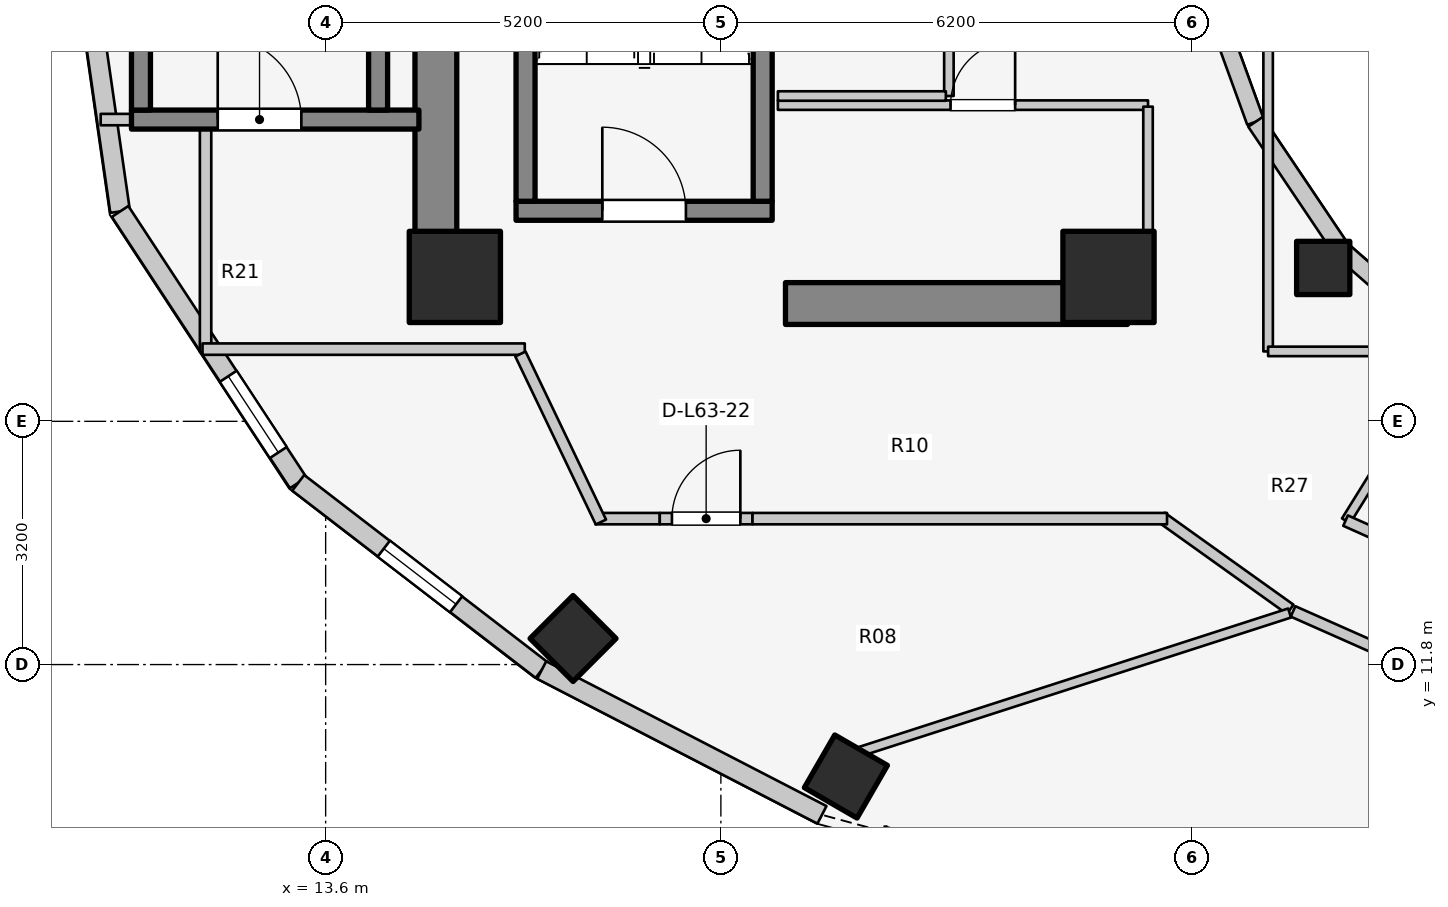
"""IFC4 building model, lengths in metres.
Left out: names, types, materials, properties, quantities, classifications, styles, units other than length and angle.
Written with IfcOpenShell. Run it as: python <this file> out.ifc"""

import sys

from ifc_helpers import new_model, si_unit, direction, frame, frame_2d, origin, origin_2d, place, context, subcontext, project, spatial, rectangle, extrude, element, fill, save


model = new_model("IFC4")
c1 = context("Model", 3, precision=1e-05, world=origin(), true_north=direction((0.0, 1.0)))
c2 = subcontext(c1, "Body", "Model", "MODEL_VIEW")
j1 = project(units=[si_unit("LENGTHUNIT", "METRE"), si_unit("PLANEANGLEUNIT", "RADIAN")], contexts=[c1])
p1 = place(None, origin())
s1 = spatial("IfcSite", under=j1, at=p1, CompositionType="ELEMENT")
p2 = place(p1, origin())
s2 = spatial("IfcBuilding", under=s1, at=p2, CompositionType="ELEMENT")
p3 = place(p2, frame((0.0, 0.0, 207.8)))
s3 = spatial("IfcBuildingStorey", under=s2, at=p3, CompositionType="ELEMENT", Elevation=207.8)
p4 = place(p3, frame((15.05, 17.05, 0.0), z_axis=(0.0, 0.0, 1.0), x_axis=(0.0, 1.0, 0.0)))
e1 = element("IfcWall", 1, at=p4, inside=s3, PredefinedType="SHEAR", context=c2, shape_type="SweptSolid", body=[
    extrude(rectangle(XDim=12.8, YDim=0.55, at=frame_2d((6.4, 0.0))), origin(), (0.0, 0.0, 1.0), 3.1),
])
p5 = place(p3, frame((19.65, 16.55, 0.0), z_axis=(0.0, 0.0, 1.0), x_axis=(1.0, 0.0, 0.0)))
e2 = element("IfcWall", 2, at=p5, inside=s3, PredefinedType="SHEAR", context=c2, shape_type="SweptSolid", body=[
    extrude(rectangle(XDim=4.5, YDim=0.55, at=frame_2d((2.25, 0.0))), origin(), (0.0, 0.0, 1.0), 3.1),
])
p6 = place(p3, frame((16.105, 17.77, 0.0), z_axis=(0.0, 0.0, 1.0), x_axis=(1.0, 0.0, 0.0)))
e3 = element("IfcWall", 3, at=p6, inside=s3, PredefinedType="SOLIDWALL", context=c2, shape_type="SweptSolid", body=[
    extrude(rectangle(XDim=3.37, YDim=0.25, at=frame_2d((1.685, 0.0))), origin(), (0.0, 0.0, 1.0), 3.1),
])
p7 = place(p6, frame((1.135, 0.0, 0.0)))
e4 = element("IfcOpeningElement", 4, at=p7, cuts=e3, PredefinedType="OPENING", context=c2, shape_type="SweptSolid", body=[
    extrude(rectangle(XDim=1.1, YDim=2.1, at=frame_2d((0.55, 1.05))), frame((0.0, 0.135, 0.0), z_axis=(0.0, -1.0, 0.0), x_axis=(1.0, 0.0, 0.0)), (0.0, 0.0, 1.0), 0.27),
])
for number, where, z_axis, x_axis in (
    (5, (16.23, 17.895, 0.0), (0.0, 0.0, 1.0), (0.0, 1.0, 0.0)),
    (6, (19.35, 17.895, 0.0), (0.0, 0.0, 1.0), (0.0, 1.0, 0.0)),
):
    element("IfcWall", number, at=place(p3, frame(where, z_axis=z_axis, x_axis=x_axis)), inside=s3, PredefinedType="SOLIDWALL", context=c2, shape_type="SweptSolid", body=[
        extrude(rectangle(XDim=7.81, YDim=0.25, at=frame_2d((3.905, 0.0))), origin(), (0.0, 0.0, 1.0), 3.1),
    ])
p8 = place(p3, frame((11.045, 18.97, 0.0), z_axis=(0.0, 0.0, 1.0), x_axis=(1.0, 0.0, 0.0)))
e7 = element("IfcWall", 7, at=p8, inside=s3, PredefinedType="SOLIDWALL", context=c2, shape_type="SweptSolid", body=[
    extrude(rectangle(XDim=3.782, YDim=0.25, at=frame_2d((1.891, 0.0))), origin(), (0.0, 0.0, 1.0), 3.1),
])
p9 = place(p8, frame((1.135, 0.0, 0.0)))
e8 = element("IfcOpeningElement", 8, at=p9, cuts=e7, PredefinedType="OPENING", context=c2, shape_type="SweptSolid", body=[
    extrude(rectangle(XDim=1.1, YDim=2.1, at=frame_2d((0.55, 1.05))), frame((0.0, 0.135, 0.0), z_axis=(0.0, -1.0, 0.0), x_axis=(1.0, 0.0, 0.0)), (0.0, 0.0, 1.0), 0.27),
])
for number, where, z_axis, x_axis in (
    (9, (11.17, 19.095, 0.0), (0.0, 0.0, 1.0), (0.0, 1.0, 0.0)),
    (10, (14.29, 19.095, 0.0), (0.0, 0.0, 1.0), (0.0, 1.0, 0.0)),
):
    element("IfcWall", number, at=place(p3, frame(where, z_axis=z_axis, x_axis=x_axis)), inside=s3, PredefinedType="SOLIDWALL", context=c2, shape_type="SweptSolid", body=[
        extrude(rectangle(XDim=7.81, YDim=0.25, at=frame_2d((3.905, 0.0))), origin(), (0.0, 0.0, 1.0), 3.1),
    ])
for number, where, z_axis, x_axis in (
    (11, (15.3, 16.9, 0.0), (0.0, 0.0, 1.0), (1.0, 0.0, 0.0)),
    (12, (23.9, 16.9, 0.0), (0.0, 0.0, 1.0), (1.0, 0.0, 0.0)),
):
    element("IfcColumn", number, at=place(p3, frame(where, z_axis=z_axis, x_axis=x_axis)), inside=s3, PredefinedType="COLUMN", context=c2, shape_type="SweptSolid", body=[
        extrude(rectangle(XDim=1.2, YDim=1.2, at=origin_2d()), origin(), (0.0, 0.0, 1.0), 3.1),
    ])
p10 = place(p3, frame((26.725, 17.018, 0.0), z_axis=(0.0, 0.0, 1.0), x_axis=(1.0, 0.0, 0.0)))
e13 = element("IfcColumn", 13, at=p10, inside=s3, PredefinedType="COLUMN", context=c2, shape_type="SweptSolid", body=[
    extrude(rectangle(XDim=0.7, YDim=0.7, at=origin_2d()), origin(), (0.0, 0.0, 1.0), 3.1),
])
for number, where, z_axis, x_axis in (
    (14, (16.855, 12.143, 0.0), (0.0, 0.0, 1.0), (-0.707, -0.707, 0.0)),
    (15, (20.445, 10.327, 0.0), (0.0, 0.0, 1.0), (-0.5, -0.866, 0.0)),
):
    element("IfcColumn", number, at=place(p3, frame(where, z_axis=z_axis, x_axis=x_axis)), inside=s3, PredefinedType="COLUMN", context=c2, shape_type="SweptSolid", body=[
        extrude(rectangle(XDim=0.8, YDim=0.8, at=origin_2d()), origin(), (0.0, 0.0, 1.0), 3.1),
    ])
p11 = place(p3, frame((25.123, 20.898, 0.0), z_axis=(0.0, 0.0, 1.0), x_axis=(0.341423187295, -0.93990968033, 0.0)))
e16 = element("IfcWall", 16, at=p11, inside=s3, PredefinedType="STANDARD", context=c2, shape_type="SweptSolid", body=[
    extrude(rectangle(XDim=2.084, YDim=0.23, at=frame_2d((1.042, 0.0))), origin(), (0.0, 0.0, 1.0), 2.56),
])
p12 = place(p3, frame((25.834, 18.94, 0.0), z_axis=(0.0, 0.0, 1.0), x_axis=(0.558197800898, -0.829707909492, 0.0)))
e17 = element("IfcWall", 17, at=p12, inside=s3, PredefinedType="STANDARD", context=c2, shape_type="SweptSolid", body=[
    extrude(rectangle(XDim=2.027, YDim=0.23, at=frame_2d((1.013, 0.0))), origin(), (0.0, 0.0, 1.0), 1.22),
])
p13 = place(p3, frame((26.965, 17.258, 0.0), z_axis=(0.0, 0.0, 1.0), x_axis=(0.752576694707, -0.658504607869, 0.0)))
e18 = element("IfcWall", 18, at=p13, inside=s3, PredefinedType="STANDARD", context=c2, shape_type="SweptSolid", body=[
    extrude(rectangle(XDim=1.959, YDim=0.23, at=frame_2d((0.98, 0.0))), origin(), (0.0, 0.0, 1.0), 1.22),
])
p14 = place(p3, frame((10.14, 23.0, 0.0), z_axis=(0.0, 0.0, 1.0), x_axis=(0.142712754019, -0.989764148593, 0.0)))
e19 = element("IfcWall", 19, at=p14, inside=s3, PredefinedType="STANDARD", context=c2, shape_type="SweptSolid", body=[
    extrude(rectangle(XDim=5.293, YDim=0.26, at=frame_2d((2.646, 0.0))), origin(), (0.0, 0.0, 1.0), 2.57),
])
p15 = place(p14, frame((1.458, 0.0, 0.75)))
e20 = element("IfcOpeningElement", 20, at=p15, cuts=e19, PredefinedType="OPENING", context=c2, shape_type="SweptSolid", body=[
    extrude(rectangle(XDim=1.2, YDim=1.5, at=frame_2d((0.6, 0.75))), frame((0.0, 0.14, 0.0), z_axis=(0.0, -1.0, 0.0), x_axis=(1.0, 0.0, 0.0)), (0.0, 0.0, 1.0), 0.28),
])
p16 = place(p3, frame((10.895, 17.761, 0.0), z_axis=(0.0, 0.0, 1.0), x_axis=(0.548776305075, -0.835969238064, 0.0)))
e21 = element("IfcWall", 21, at=p16, inside=s3, PredefinedType="STANDARD", context=c2, shape_type="SweptSolid", body=[
    extrude(rectangle(XDim=4.271, YDim=0.26, at=frame_2d((2.135, 0.0))), origin(), (0.0, 0.0, 1.0), 1.22),
])
p17 = place(p16, frame((2.594, 0.0, 0.15)))
e22 = element("IfcOpeningElement", 22, at=p17, cuts=e21, PredefinedType="OPENING", context=c2, shape_type="SweptSolid", body=[
    extrude(rectangle(XDim=1.2, YDim=0.9, at=frame_2d((0.6, 0.45))), frame((0.0, 0.14, 0.0), z_axis=(0.0, -1.0, 0.0), x_axis=(1.0, 0.0, 0.0)), (0.0, 0.0, 1.0), 0.28),
])
p18 = place(p3, frame((13.239, 14.191, 0.0), z_axis=(0.0, 0.0, 1.0), x_axis=(0.792713817907, -0.609593965603, 0.0)))
e23 = element("IfcWall", 23, at=p18, inside=s3, PredefinedType="STANDARD", context=c2, shape_type="SweptSolid", body=[
    extrude(rectangle(XDim=4.041, YDim=0.26, at=frame_2d((2.021, 0.0))), origin(), (0.0, 0.0, 1.0), 1.22),
])
p19 = place(p18, frame((1.42, 0.0, 0.15)))
e24 = element("IfcOpeningElement", 24, at=p19, cuts=e23, PredefinedType="OPENING", context=c2, shape_type="SweptSolid", body=[
    extrude(rectangle(XDim=1.2, YDim=0.9, at=frame_2d((0.6, 0.45))), frame((0.0, 0.14, 0.0), z_axis=(0.0, -1.0, 0.0), x_axis=(1.0, 0.0, 0.0)), (0.0, 0.0, 1.0), 0.28),
])
p20 = place(p3, frame((16.442, 11.728, 0.0), z_axis=(0.0, 0.0, 1.0), x_axis=(0.88849146803, -0.458893137057, 0.0)))
e25 = element("IfcWall", 25, at=p20, inside=s3, PredefinedType="STANDARD", context=c2, shape_type="SweptSolid", body=[
    extrude(rectangle(XDim=4.15, YDim=0.26, at=frame_2d((2.075, 0.0))), origin(), (0.0, 0.0, 1.0), 1.22),
])
p21 = place(p3, frame((19.55, 19.16, 0.0), z_axis=(0.0, 0.0, 1.0), x_axis=(1.0, 0.0, 0.0)))
e26 = element("IfcWall", 26, at=p21, inside=s3, PredefinedType="PARTITIONING", context=c2, shape_type="SweptSolid", body=[
    extrude(rectangle(XDim=4.87, YDim=0.125, at=frame_2d((2.435, 0.0))), origin(), (0.0, 0.0, 1.0), 2.12),
])
p22 = place(p21, frame((2.272, 0.0, 0.0)))
e27 = element("IfcOpeningElement", 27, at=p22, cuts=e26, PredefinedType="OPENING", context=c2, shape_type="SweptSolid", body=[
    extrude(rectangle(XDim=0.85, YDim=2.05, at=frame_2d((0.425, 1.025))), frame((0.0, 0.073, 0.0), z_axis=(0.0, -1.0, 0.0), x_axis=(1.0, 0.0, 0.0)), (0.0, 0.0, 1.0), 0.145),
])
p23 = place(p3, frame((24.42, 17.1, 0.0), z_axis=(0.0, 0.0, 1.0), x_axis=(0.0, 1.0, 0.0)))
e28 = element("IfcWall", 28, at=p23, inside=s3, PredefinedType="PARTITIONING", context=c2, shape_type="SweptSolid", body=[
    extrude(rectangle(XDim=2.04, YDim=0.125, at=frame_2d((1.02, 0.0))), origin(), (0.0, 0.0, 1.0), 1.952),
])
p24 = place(p3, frame((21.8, 19.28, 0.0), z_axis=(0.0, 0.0, 1.0), x_axis=(0.0, 1.0, 0.0)))
e29 = element("IfcWall", 29, at=p24, inside=s3, PredefinedType="PARTITIONING", context=c2, shape_type="SweptSolid", body=[
    extrude(rectangle(XDim=2.4, YDim=0.125, at=frame_2d((1.2, 0.0))), origin(), (0.0, 0.0, 1.0), 2.575),
])
p25 = place(p24, frame((0.7, 0.0, 0.0)))
e30 = element("IfcOpeningElement", 30, at=p25, cuts=e29, PredefinedType="OPENING", context=c2, shape_type="SweptSolid", body=[
    extrude(rectangle(XDim=0.85, YDim=2.05, at=frame_2d((0.425, 1.025))), frame((0.0, 0.073, 0.0), z_axis=(0.0, -1.0, 0.0), x_axis=(1.0, 0.0, 0.0)), (0.0, 0.0, 1.0), 0.145),
])
p26 = place(p3, frame((19.55, 19.28, 0.0), z_axis=(0.0, 0.0, 1.0), x_axis=(1.0, 0.0, 0.0)))
e31 = element("IfcWall", 31, at=p26, inside=s3, PredefinedType="PARTITIONING", context=c2, shape_type="SweptSolid", body=[
    extrude(rectangle(XDim=2.21, YDim=0.125, at=frame_2d((1.105, 0.0))), origin(), (0.0, 0.0, 1.0), 2.12),
])
p27 = place(p3, frame((28.45, 15.985, 0.0), z_axis=(0.0, 0.0, 1.0), x_axis=(-0.527527080983, -0.849538215049, 0.0)))
e32 = element("IfcWall", 32, at=p27, inside=s3, PredefinedType="PARTITIONING", context=c2, shape_type="SweptSolid", body=[
    extrude(rectangle(XDim=2.701, YDim=0.125, at=frame_2d((1.351, 0.0))), origin(), (0.0, 0.0, 1.0), 1.22),
])
p28 = place(p3, frame((27.019, 13.694, 0.0), z_axis=(0.0, 0.0, 1.0), x_axis=(0.912628408652, -0.408790151203, 0.0)))
e33 = element("IfcWall", 33, at=p28, inside=s3, PredefinedType="PARTITIONING", context=c2, shape_type="SweptSolid", body=[
    extrude(rectangle(XDim=2.638, YDim=0.15, at=frame_2d((1.319, 0.0))), origin(), (0.0, 0.0, 1.0), 1.22),
])
p29 = place(p3, frame((26.0, 15.92, 0.0), z_axis=(0.0, 0.0, 1.0), x_axis=(0.0, 1.0, 0.0)))
e34 = element("IfcWall", 34, at=p29, inside=s3, PredefinedType="PARTITIONING", context=c2, shape_type="SweptSolid", body=[
    extrude(rectangle(XDim=4.28, YDim=0.125, at=frame_2d((2.14, 0.0))), origin(), (0.0, 0.0, 1.0), 1.22),
])
p30 = place(p3, frame((26.0, 15.92, 0.0), z_axis=(0.0, 0.0, 1.0), x_axis=(1.0, 0.0, 0.0)))
e35 = element("IfcWall", 35, at=p30, inside=s3, PredefinedType="PARTITIONING", context=c2, shape_type="SweptSolid", body=[
    extrude(rectangle(XDim=2.6, YDim=0.125, at=frame_2d((1.3, 0.0))), origin(), (0.0, 0.0, 1.0), 1.22),
])
p31 = place(p3, frame((10.64, 18.97, 0.0), z_axis=(0.0, 0.0, 1.0), x_axis=(1.0, 0.0, 0.0)))
e36 = element("IfcWall", 36, at=p31, inside=s3, PredefinedType="PARTITIONING", context=c2, shape_type="SweptSolid", body=[
    extrude(rectangle(XDim=0.4, YDim=0.15, at=frame_2d((0.2, 0.0))), origin(), (0.0, 0.0, 1.0), 2.575),
])
p32 = place(p3, frame((12.02, 15.91, 0.0), z_axis=(0.0, 0.0, 1.0), x_axis=(0.0, 1.0, 0.0)))
e37 = element("IfcWall", 37, at=p32, inside=s3, PredefinedType="PARTITIONING", context=c2, shape_type="SweptSolid", body=[
    extrude(rectangle(XDim=2.93, YDim=0.15, at=frame_2d((1.465, 0.0))), origin(), (0.0, 0.0, 1.0), 2.575),
])
p33 = place(p3, frame((11.98, 15.95, 0.0), z_axis=(0.0, 0.0, 1.0), x_axis=(1.0, 0.0, 0.0)))
e38 = element("IfcWall", 38, at=p33, inside=s3, PredefinedType="PARTITIONING", context=c2, shape_type="SweptSolid", body=[
    extrude(rectangle(XDim=4.24, YDim=0.15, at=frame_2d((2.12, 0.0))), origin(), (0.0, 0.0, 1.0), 1.22),
])
p34 = place(p3, frame((26.29, 12.527, 0.0), z_axis=(0.0, 0.0, 1.0), x_axis=(-0.813780999276, 0.581171648669, 0.0)))
e39 = element("IfcWall", 39, at=p34, inside=s3, PredefinedType="PARTITIONING", context=c2, shape_type="SweptSolid", body=[
    extrude(rectangle(XDim=2.082, YDim=0.15, at=frame_2d((1.041, 0.0))), origin(), (0.0, 0.0, 1.0), 1.22),
])
p35 = place(p3, frame((17.15, 13.72, 0.0), z_axis=(0.0, 0.0, 1.0), x_axis=(1.0, 0.0, 0.0)))
e40 = element("IfcWall", 40, at=p35, inside=s3, PredefinedType="PARTITIONING", context=c2, shape_type="SweptSolid", body=[
    extrude(rectangle(XDim=0.846, YDim=0.15, at=frame_2d((0.423, 0.0))), origin(), (0.0, 0.0, 1.0), 2.575),
])
p36 = place(p3, frame((17.996, 13.72, 0.0), z_axis=(0.0, 0.0, 1.0), x_axis=(1.0, 0.0, 0.0)))
e41 = element("IfcWall", 41, at=p36, inside=s3, PredefinedType="PARTITIONING", context=c2, shape_type="SweptSolid", body=[
    extrude(rectangle(XDim=1.22, YDim=0.15, at=frame_2d((0.61, 0.0))), origin(), (0.0, 0.0, 1.0), 2.16),
])
p37 = place(p36, frame((0.16, 0.0, 0.0)))
e42 = element("IfcOpeningElement", 42, at=p37, cuts=e41, PredefinedType="OPENING", context=c2, shape_type="SweptSolid", body=[
    extrude(rectangle(XDim=0.9, YDim=2.1, at=frame_2d((0.45, 1.05))), frame((0.0, 0.085, 0.0), z_axis=(0.0, -1.0, 0.0), x_axis=(1.0, 0.0, 0.0)), (0.0, 0.0, 1.0), 0.17),
])
p38 = place(p3, frame((19.216, 13.72, 0.0), z_axis=(0.0, 0.0, 1.0), x_axis=(1.0, 0.0, 0.0)))
e43 = element("IfcWall", 43, at=p38, inside=s3, PredefinedType="PARTITIONING", context=c2, shape_type="SweptSolid", body=[
    extrude(rectangle(XDim=5.454, YDim=0.15, at=frame_2d((2.727, 0.0))), origin(), (0.0, 0.0, 1.0), 1.22),
])
p39 = place(p3, frame((17.222, 13.675, 0.0), z_axis=(0.0, 0.0, 1.0), x_axis=(-0.431973389813, 0.901886351207, 0.0)))
e44 = element("IfcWall", 44, at=p39, inside=s3, PredefinedType="PARTITIONING", context=c2, shape_type="SweptSolid", body=[
    extrude(rectangle(XDim=2.452, YDim=0.15, at=frame_2d((1.226, 0.0))), origin(), (0.0, 0.0, 1.0), 2.575),
])
p40 = place(p3, frame((26.283, 12.478, 0.0), z_axis=(0.0, 0.0, 1.0), x_axis=(-0.951711719757, -0.306993163568, 0.0)))
e45 = element("IfcWall", 45, at=p40, inside=s3, PredefinedType="PARTITIONING", context=c2, shape_type="SweptSolid", body=[
    extrude(rectangle(XDim=5.934, YDim=0.125, at=frame_2d((2.967, 0.0))), origin(), (0.0, 0.0, 1.0), 1.22),
])
p41 = place(p3, frame((26.328, 12.499, 0.0), z_axis=(0.0, 0.0, 1.0), x_axis=(0.914139569865, -0.405399613724, 0.0)))
e46 = element("IfcWall", 46, at=p41, inside=s3, PredefinedType="PARTITIONING", context=c2, shape_type="SweptSolid", body=[
    extrude(rectangle(XDim=3.005, YDim=0.15, at=frame_2d((1.502, 0.0))), origin(), (0.0, 0.0, 1.0), 1.22),
])
p42 = place(p17, origin())
e47 = element("IfcWindow", 47, at=p42, inside=s3, PartitioningType="SINGLE_PANEL", PredefinedType="WINDOW", context=c2, shape_type="SweptSolid", body=[
    extrude(rectangle(XDim=1.2, YDim=0.9, at=frame_2d((0.6, 0.45))), frame((0.0, 0.03, 0.0), z_axis=(0.0, -1.0, 0.0), x_axis=(1.0, 0.0, 0.0)), (0.0, 0.0, 1.0), 0.06),
])
fill(e22, e47)
p43 = place(p19, origin())
e48 = element("IfcWindow", 48, at=p43, inside=s3, PartitioningType="SINGLE_PANEL", PredefinedType="WINDOW", context=c2, shape_type="SweptSolid", body=[
    extrude(rectangle(XDim=1.2, YDim=0.9, at=frame_2d((0.6, 0.45))), frame((0.0, 0.03, 0.0), z_axis=(0.0, -1.0, 0.0), x_axis=(1.0, 0.0, 0.0)), (0.0, 0.0, 1.0), 0.06),
])
fill(e24, e48)
p44 = place(p7, origin())
e49 = element("IfcDoor", 49, at=p44, inside=s3, OperationType="SINGLE_SWING_LEFT", PredefinedType="DOOR", context=c2, shape_type="SweptSolid", body=[
    extrude(rectangle(XDim=1.1, YDim=2.1, at=frame_2d((0.55, 1.05))), frame((0.0, 0.025, 0.0), z_axis=(0.0, -1.0, 0.0), x_axis=(1.0, 0.0, 0.0)), (0.0, 0.0, 1.0), 0.05),
])
fill(e4, e49)
p45 = place(p9, origin())
e50 = element("IfcDoor", 50, at=p45, inside=s3, OperationType="SINGLE_SWING_LEFT", PredefinedType="DOOR", context=c2, shape_type="SweptSolid", body=[
    extrude(rectangle(XDim=1.1, YDim=2.1, at=frame_2d((0.55, 1.05))), frame((0.0, 0.025, 0.0), z_axis=(0.0, -1.0, 0.0), x_axis=(1.0, 0.0, 0.0)), (0.0, 0.0, 1.0), 0.05),
])
fill(e8, e50)
p46 = place(p22, origin())
e51 = element("IfcDoor", 51, at=p46, inside=s3, OperationType="SINGLE_SWING_RIGHT", PredefinedType="DOOR", context=c2, shape_type="SweptSolid", body=[
    extrude(rectangle(XDim=0.85, YDim=2.05, at=frame_2d((0.425, 1.025))), frame((0.0, 0.025, 0.0), z_axis=(0.0, -1.0, 0.0), x_axis=(1.0, 0.0, 0.0)), (0.0, 0.0, 1.0), 0.05),
])
fill(e27, e51)
p47 = place(p37, origin())
e52 = element("IfcDoor", 52, at=p47, inside=s3, OperationType="SINGLE_SWING_RIGHT", PredefinedType="DOOR", context=c2, shape_type="SweptSolid", body=[
    extrude(rectangle(XDim=0.9, YDim=2.1, at=frame_2d((0.45, 1.05))), frame((0.0, 0.025, 0.0), z_axis=(0.0, -1.0, 0.0), x_axis=(1.0, 0.0, 0.0)), (0.0, 0.0, 1.0), 0.05),
])
fill(e42, e52)
save(model, sys.argv[1])
